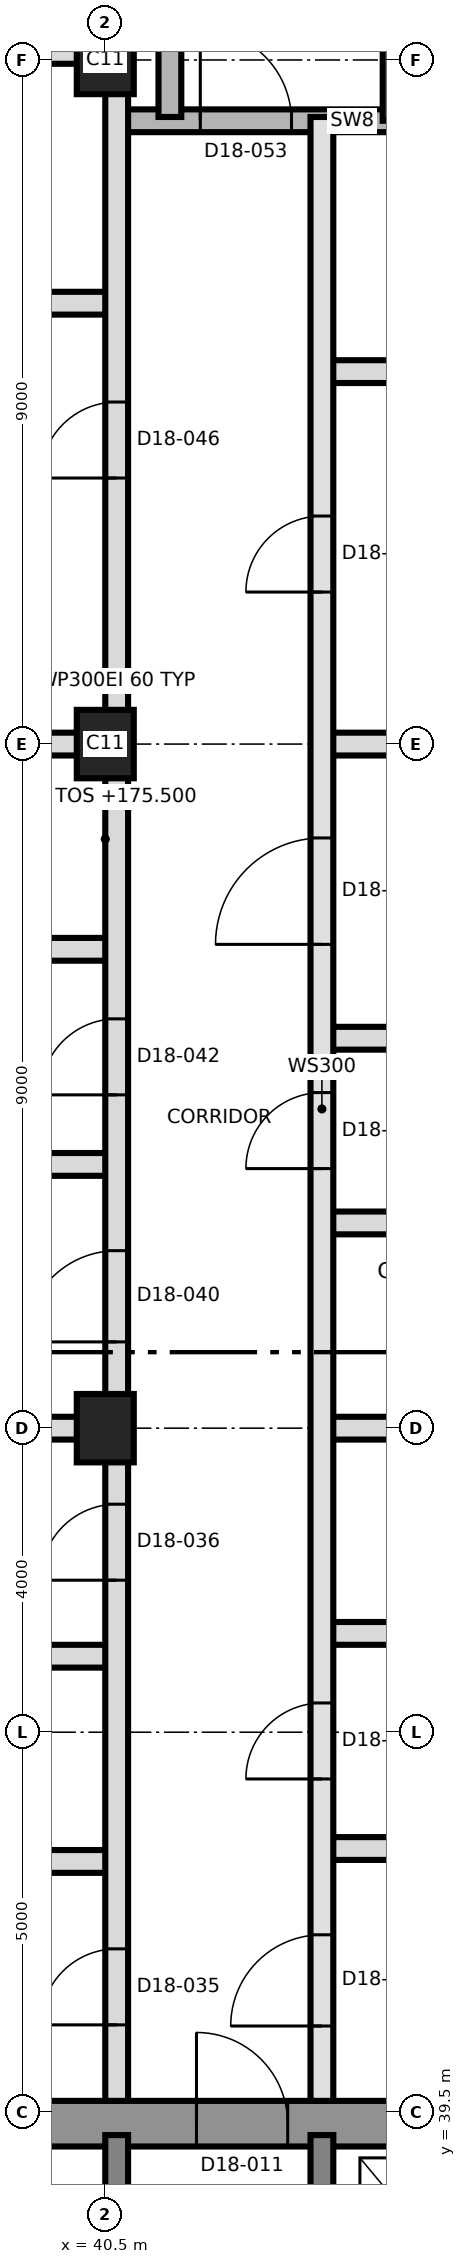
"""IFC4 building model, lengths in metres.
Left out: names, types, materials, properties, quantities, classifications, styles, units other than length and angle.
Written with IfcOpenShell. Run it as: python <this file> out.ifc"""

import sys

from ifc_helpers import new_model, si_unit, direction, frame, frame_2d, origin, origin_2d, place, context, subcontext, project, spatial, rectangle, extrude, element, fill, save


model = new_model("IFC4")
c1 = context("Model", 3, precision=1e-05, world=origin(), true_north=direction((0.0, 1.0)))
c2 = subcontext(c1, "Body", "Model", "MODEL_VIEW")
j1 = project(units=[si_unit("LENGTHUNIT", "METRE"), si_unit("PLANEANGLEUNIT", "RADIAN")], contexts=[c1])
p1 = place(None, origin())
s1 = spatial("IfcSite", under=j1, at=p1, CompositionType="ELEMENT")
p2 = place(p1, origin())
s2 = spatial("IfcBuilding", under=s1, at=p2, CompositionType="ELEMENT")
p3 = place(p2, frame((0.0, 0.0, 175.5)))
s3 = spatial("IfcBuildingStorey", under=s2, at=p3, CompositionType="ELEMENT", Elevation=175.5)
p4 = place(p3, frame((31.2, 39.35, 0.0), z_axis=(0.0, 0.0, 1.0), x_axis=(1.0, 0.0, 0.0)))
e1 = element("IfcWall", 1, at=p4, inside=s3, PredefinedType="SHEAR", context=c2, shape_type="SweptSolid", body=[
    extrude(rectangle(XDim=27.0, YDim=0.6, at=frame_2d((13.5, 0.0))), origin(), (0.0, 0.0, 1.0), 3.7),
])
p5 = place(p4, frame((10.5, 0.0, 0.0)))
e2 = element("IfcOpeningElement", 2, at=p5, cuts=e1, PredefinedType="OPENING", context=c2, shape_type="SweptSolid", body=[
    extrude(rectangle(XDim=1.2, YDim=2.1, at=frame_2d((0.6, 1.05))), frame((0.0, 0.31, 0.0), z_axis=(0.0, -1.0, 0.0), x_axis=(1.0, 0.0, 0.0)), (0.0, 0.0, 1.0), 0.62),
])
for number, where, z_axis, x_axis in (
    (3, (40.65, 33.5, 0.0), (0.0, 0.0, 1.0), (0.0, 1.0, 0.0)),
    (4, (43.35, 33.5, 0.0), (0.0, 0.0, 1.0), (0.0, 1.0, 0.0)),
):
    element("IfcWall", number, at=place(p3, frame(where, z_axis=z_axis, x_axis=x_axis)), inside=s3, PredefinedType="SHEAR", context=c2, shape_type="SweptSolid", body=[
        extrude(rectangle(XDim=5.7, YDim=0.3, at=frame_2d((2.85, 0.0))), origin(), (0.0, 0.0, 1.0), 3.7),
    ])
for number, where, z_axis, x_axis in (
    (5, (40.5, 48.5, 0.0), (0.0, 0.0, 1.0), (0.0, 1.0, 0.0)),
    (6, (40.5, 57.5, 0.0), (0.0, 0.0, 1.0), (0.0, 1.0, 0.0)),
    (7, (40.5, 66.5, 0.0), (0.0, 0.0, 1.0), (0.0, 1.0, 0.0)),
):
    element("IfcColumn", number, at=place(p3, frame(where, z_axis=z_axis, x_axis=x_axis)), inside=s3, PredefinedType="COLUMN", context=c2, shape_type="SweptSolid", body=[
        extrude(rectangle(XDim=0.9, YDim=0.75, at=origin_2d()), origin(), (0.0, 0.0, 1.0), 3.7),
    ])
p6 = place(p3, frame((37.45, 42.8, 0.0), z_axis=(0.0, 0.0, 1.0), x_axis=(1.0, 0.0, 0.0)))
e8 = element("IfcWall", 8, at=p6, inside=s3, PredefinedType="PARTITIONING", context=c2, shape_type="SweptSolid", body=[
    extrude(rectangle(XDim=3.2, YDim=0.3, at=frame_2d((1.6, 0.0))), origin(), (0.0, 0.0, 1.0), 3.4),
])
p7 = place(p3, frame((43.35, 42.97, 0.0), z_axis=(0.0, 0.0, 1.0), x_axis=(1.0, 0.0, 0.0)))
e9 = element("IfcWall", 9, at=p7, inside=s3, PredefinedType="PARTITIONING", context=c2, shape_type="SweptSolid", body=[
    extrude(rectangle(XDim=9.163, YDim=0.3, at=frame_2d((4.582, 0.0))), origin(), (0.0, 0.0, 1.0), 3.4),
])
p8 = place(p3, frame((29.705, 45.5, 0.0), z_axis=(0.0, 0.0, 1.0), x_axis=(1.0, 0.0, 0.0)))
e10 = element("IfcWall", 10, at=p8, inside=s3, PredefinedType="PARTITIONING", context=c2, shape_type="SweptSolid", body=[
    extrude(rectangle(XDim=10.945, YDim=0.3, at=frame_2d((5.472, 0.0))), origin(), (0.0, 0.0, 1.0), 3.4),
])
p9 = place(p3, frame((43.35, 45.8, 0.0), z_axis=(0.0, 0.0, 1.0), x_axis=(1.0, 0.0, 0.0)))
e11 = element("IfcWall", 11, at=p9, inside=s3, PredefinedType="PARTITIONING", context=c2, shape_type="SweptSolid", body=[
    extrude(rectangle(XDim=3.2, YDim=0.3, at=frame_2d((1.6, 0.0))), origin(), (0.0, 0.0, 1.0), 3.4),
])
p10 = place(p3, frame((29.705, 48.5, 0.0), z_axis=(0.0, 0.0, 1.0), x_axis=(1.0, 0.0, 0.0)))
e12 = element("IfcWall", 12, at=p10, inside=s3, PredefinedType="PARTITIONING", context=c2, shape_type="SweptSolid", body=[
    extrude(rectangle(XDim=10.945, YDim=0.3, at=frame_2d((5.472, 0.0))), origin(), (0.0, 0.0, 1.0), 3.4),
])
p11 = place(p3, frame((43.35, 48.5, 0.0), z_axis=(0.0, 0.0, 1.0), x_axis=(1.0, 0.0, 0.0)))
e13 = element("IfcWall", 13, at=p11, inside=s3, PredefinedType="PARTITIONING", context=c2, shape_type="SweptSolid", body=[
    extrude(rectangle(XDim=8.125, YDim=0.3, at=frame_2d((4.062, 0.0))), origin(), (0.0, 0.0, 1.0), 3.4),
])
p12 = place(p3, frame((43.35, 51.2, 0.0), z_axis=(0.0, 0.0, 1.0), x_axis=(1.0, 0.0, 0.0)))
e14 = element("IfcWall", 14, at=p12, inside=s3, PredefinedType="PARTITIONING", context=c2, shape_type="SweptSolid", body=[
    extrude(rectangle(XDim=3.2, YDim=0.3, at=frame_2d((1.6, 0.0))), origin(), (0.0, 0.0, 1.0), 3.4),
])
p13 = place(p3, frame((29.705, 51.97, 0.0), z_axis=(0.0, 0.0, 1.0), x_axis=(1.0, 0.0, 0.0)))
e15 = element("IfcWall", 15, at=p13, inside=s3, PredefinedType="PARTITIONING", context=c2, shape_type="SweptSolid", body=[
    extrude(rectangle(XDim=10.945, YDim=0.3, at=frame_2d((5.472, 0.0))), origin(), (0.0, 0.0, 1.0), 3.4),
])
p14 = place(p3, frame((43.35, 53.63, 0.0), z_axis=(0.0, 0.0, 1.0), x_axis=(1.0, 0.0, 0.0)))
e16 = element("IfcWall", 16, at=p14, inside=s3, PredefinedType="PARTITIONING", context=c2, shape_type="SweptSolid", body=[
    extrude(rectangle(XDim=8.125, YDim=0.3, at=frame_2d((4.062, 0.0))), origin(), (0.0, 0.0, 1.0), 3.4),
])
p15 = place(p3, frame((37.45, 54.8, 0.0), z_axis=(0.0, 0.0, 1.0), x_axis=(1.0, 0.0, 0.0)))
e17 = element("IfcWall", 17, at=p15, inside=s3, PredefinedType="PARTITIONING", context=c2, shape_type="SweptSolid", body=[
    extrude(rectangle(XDim=3.2, YDim=0.3, at=frame_2d((1.6, 0.0))), origin(), (0.0, 0.0, 1.0), 3.4),
])
p16 = place(p3, frame((29.705, 57.5, 0.0), z_axis=(0.0, 0.0, 1.0), x_axis=(1.0, 0.0, 0.0)))
e18 = element("IfcWall", 18, at=p16, inside=s3, PredefinedType="PARTITIONING", context=c2, shape_type="SweptSolid", body=[
    extrude(rectangle(XDim=10.945, YDim=0.3, at=frame_2d((5.472, 0.0))), origin(), (0.0, 0.0, 1.0), 3.4),
])
p17 = place(p3, frame((43.35, 57.5, 0.0), z_axis=(0.0, 0.0, 1.0), x_axis=(1.0, 0.0, 0.0)))
e19 = element("IfcWall", 19, at=p17, inside=s3, PredefinedType="PARTITIONING", context=c2, shape_type="SweptSolid", body=[
    extrude(rectangle(XDim=8.125, YDim=0.3, at=frame_2d((4.062, 0.0))), origin(), (0.0, 0.0, 1.0), 3.4),
])
p18 = place(p3, frame((43.35, 62.4, 0.0), z_axis=(0.0, 0.0, 1.0), x_axis=(1.0, 0.0, 0.0)))
e20 = element("IfcWall", 20, at=p18, inside=s3, PredefinedType="PARTITIONING", context=c2, shape_type="SweptSolid", body=[
    extrude(rectangle(XDim=8.125, YDim=0.3, at=frame_2d((4.062, 0.0))), origin(), (0.0, 0.0, 1.0), 3.4),
])
p19 = place(p18, frame((4.65, 0.0, 0.0)))
e21 = element("IfcOpeningElement", 21, at=p19, cuts=e20, PredefinedType="OPENING", context=c2, shape_type="SweptSolid", body=[
    extrude(rectangle(XDim=1.0, YDim=2.1, at=frame_2d((0.5, 1.05))), frame((0.0, 0.16, 0.0), z_axis=(0.0, -1.0, 0.0), x_axis=(1.0, 0.0, 0.0)), (0.0, 0.0, 1.0), 0.32),
])
p20 = place(p3, frame((29.705, 63.3, 0.0), z_axis=(0.0, 0.0, 1.0), x_axis=(1.0, 0.0, 0.0)))
e22 = element("IfcWall", 22, at=p20, inside=s3, PredefinedType="PARTITIONING", context=c2, shape_type="SweptSolid", body=[
    extrude(rectangle(XDim=10.945, YDim=0.3, at=frame_2d((5.472, 0.0))), origin(), (0.0, 0.0, 1.0), 3.4),
])
p21 = place(p20, frame((5.295, 0.0, 0.0)))
e23 = element("IfcOpeningElement", 23, at=p21, cuts=e22, PredefinedType="OPENING", context=c2, shape_type="SweptSolid", body=[
    extrude(rectangle(XDim=1.0, YDim=2.1, at=frame_2d((0.5, 1.05))), frame((0.0, 0.16, 0.0), z_axis=(0.0, -1.0, 0.0), x_axis=(1.0, 0.0, 0.0)), (0.0, 0.0, 1.0), 0.32),
])
p22 = place(p3, frame((40.65, 65.7, 0.0), z_axis=(0.0, 0.0, 1.0), x_axis=(1.0, 0.0, 0.0)))
e24 = element("IfcWall", 24, at=p22, inside=s3, PredefinedType="SHEAR", context=c2, shape_type="SweptSolid", body=[
    extrude(rectangle(XDim=6.2, YDim=0.3, at=frame_2d((3.1, 0.0))), origin(), (0.0, 0.0, 1.0), 3.4),
])
p23 = place(p22, frame((1.1, 0.0, 0.0)))
e25 = element("IfcOpeningElement", 25, at=p23, cuts=e24, PredefinedType="OPENING", context=c2, shape_type="SweptSolid", body=[
    extrude(rectangle(XDim=1.2, YDim=2.1, at=frame_2d((0.6, 1.05))), frame((0.0, 0.16, 0.0), z_axis=(0.0, -1.0, 0.0), x_axis=(1.0, 0.0, 0.0)), (0.0, 0.0, 1.0), 0.32),
])
p24 = place(p3, frame((37.15, 66.6, 0.0), z_axis=(0.0, 0.0, 1.0), x_axis=(1.0, 0.0, 0.0)))
e26 = element("IfcWall", 26, at=p24, inside=s3, PredefinedType="PARTITIONING", context=c2, shape_type="SweptSolid", body=[
    extrude(rectangle(XDim=3.5, YDim=0.3, at=frame_2d((1.75, 0.0))), origin(), (0.0, 0.0, 1.0), 3.4),
])
p25 = place(p3, frame((40.65, 39.65, 0.0), z_axis=(0.0, 0.0, 1.0), x_axis=(0.0, 1.0, 0.0)))
e27 = element("IfcWall", 27, at=p25, inside=s3, PredefinedType="PARTITIONING", context=c2, shape_type="SweptSolid", body=[
    extrude(rectangle(XDim=37.35, YDim=0.3, at=frame_2d((18.675, 0.0))), origin(), (0.0, 0.0, 1.0), 3.4),
])
p26 = place(p25, frame((1.0, 0.0, 0.0)))
e28 = element("IfcOpeningElement", 28, at=p26, cuts=e27, PredefinedType="OPENING", context=c2, shape_type="SweptSolid", body=[
    extrude(rectangle(XDim=1.0, YDim=2.1, at=frame_2d((0.5, 1.05))), frame((0.0, 0.16, 0.0), z_axis=(0.0, -1.0, 0.0), x_axis=(1.0, 0.0, 0.0)), (0.0, 0.0, 1.0), 0.32),
])
p27 = place(p25, frame((6.85, 0.0, 0.0)))
e29 = element("IfcOpeningElement", 29, at=p27, cuts=e27, PredefinedType="OPENING", context=c2, shape_type="SweptSolid", body=[
    extrude(rectangle(XDim=1.0, YDim=2.1, at=frame_2d((0.5, 1.05))), frame((0.0, 0.16, 0.0), z_axis=(0.0, -1.0, 0.0), x_axis=(1.0, 0.0, 0.0)), (0.0, 0.0, 1.0), 0.32),
])
p28 = place(p25, frame((9.985, 0.0, 0.0)))
e30 = element("IfcOpeningElement", 30, at=p28, cuts=e27, PredefinedType="OPENING", context=c2, shape_type="SweptSolid", body=[
    extrude(rectangle(XDim=1.2, YDim=2.1, at=frame_2d((0.6, 1.05))), frame((0.0, 0.16, 0.0), z_axis=(0.0, -1.0, 0.0), x_axis=(1.0, 0.0, 0.0)), (0.0, 0.0, 1.0), 0.32),
])
p29 = place(p25, frame((13.235, 0.0, 0.0)))
e31 = element("IfcOpeningElement", 31, at=p29, cuts=e27, PredefinedType="OPENING", context=c2, shape_type="SweptSolid", body=[
    extrude(rectangle(XDim=1.0, YDim=2.1, at=frame_2d((0.5, 1.05))), frame((0.0, 0.16, 0.0), z_axis=(0.0, -1.0, 0.0), x_axis=(1.0, 0.0, 0.0)), (0.0, 0.0, 1.0), 0.32),
])
p30 = place(p25, frame((21.35, 0.0, 0.0)))
e32 = element("IfcOpeningElement", 32, at=p30, cuts=e27, PredefinedType="OPENING", context=c2, shape_type="SweptSolid", body=[
    extrude(rectangle(XDim=1.0, YDim=2.4, at=frame_2d((0.5, 1.2))), frame((0.0, 0.16, 0.0), z_axis=(0.0, -1.0, 0.0), x_axis=(1.0, 0.0, 0.0)), (0.0, 0.0, 1.0), 0.32),
])
p31 = place(p3, frame((41.35, 65.75, 0.0), z_axis=(0.0, 0.0, 1.0), x_axis=(0.0, 1.0, 0.0)))
e33 = element("IfcWall", 33, at=p31, inside=s3, PredefinedType="SHEAR", context=c2, shape_type="SweptSolid", body=[
    extrude(rectangle(XDim=8.85, YDim=0.3, at=frame_2d((4.425, 0.0))), origin(), (0.0, 0.0, 1.0), 3.4),
])
p32 = place(p3, frame((43.35, 39.65, 0.0), z_axis=(0.0, 0.0, 1.0), x_axis=(0.0, 1.0, 0.0)))
e34 = element("IfcWall", 34, at=p32, inside=s3, PredefinedType="SOLIDWALL", context=c2, shape_type="SweptSolid", body=[
    extrude(rectangle(XDim=26.1, YDim=0.3, at=frame_2d((13.05, 0.0))), origin(), (0.0, 0.0, 1.0), 3.4),
])
p33 = place(p32, frame((0.985, 0.0, 0.0)))
e35 = element("IfcOpeningElement", 35, at=p33, cuts=e34, PredefinedType="OPENING", context=c2, shape_type="SweptSolid", body=[
    extrude(rectangle(XDim=1.2, YDim=2.1, at=frame_2d((0.6, 1.05))), frame((0.0, 0.16, 0.0), z_axis=(0.0, -1.0, 0.0), x_axis=(1.0, 0.0, 0.0)), (0.0, 0.0, 1.0), 0.32),
])
p34 = place(p32, frame((4.235, 0.0, 0.0)))
e36 = element("IfcOpeningElement", 36, at=p34, cuts=e34, PredefinedType="OPENING", context=c2, shape_type="SweptSolid", body=[
    extrude(rectangle(XDim=1.0, YDim=2.1, at=frame_2d((0.5, 1.05))), frame((0.0, 0.16, 0.0), z_axis=(0.0, -1.0, 0.0), x_axis=(1.0, 0.0, 0.0)), (0.0, 0.0, 1.0), 0.32),
])
p35 = place(p32, frame((12.265, 0.0, 0.0)))
e37 = element("IfcOpeningElement", 37, at=p35, cuts=e34, PredefinedType="OPENING", context=c2, shape_type="SweptSolid", body=[
    extrude(rectangle(XDim=1.0, YDim=2.1, at=frame_2d((0.5, 1.05))), frame((0.0, 0.16, 0.0), z_axis=(0.0, -1.0, 0.0), x_axis=(1.0, 0.0, 0.0)), (0.0, 0.0, 1.0), 0.32),
])
p36 = place(p32, frame((15.215, 0.0, 0.0)))
e38 = element("IfcOpeningElement", 38, at=p36, cuts=e34, PredefinedType="OPENING", context=c2, shape_type="SweptSolid", body=[
    extrude(rectangle(XDim=1.4, YDim=2.1, at=frame_2d((0.7, 1.05))), frame((0.0, 0.16, 0.0), z_axis=(0.0, -1.0, 0.0), x_axis=(1.0, 0.0, 0.0)), (0.0, 0.0, 1.0), 0.32),
])
p37 = place(p32, frame((19.85, 0.0, 0.0)))
e39 = element("IfcOpeningElement", 39, at=p37, cuts=e34, PredefinedType="OPENING", context=c2, shape_type="SweptSolid", body=[
    extrude(rectangle(XDim=1.0, YDim=2.4, at=frame_2d((0.5, 1.2))), frame((0.0, 0.16, 0.0), z_axis=(0.0, -1.0, 0.0), x_axis=(1.0, 0.0, 0.0)), (0.0, 0.0, 1.0), 0.32),
])
p38 = place(p3, frame((44.3, 65.7, 0.0), z_axis=(0.0, 0.0, 1.0), x_axis=(0.0, 1.0, 0.0)))
e40 = element("IfcWall", 40, at=p38, inside=s3, PredefinedType="SHEAR", context=c2, shape_type="SweptSolid", body=[
    extrude(rectangle(XDim=8.9, YDim=0.3, at=frame_2d((4.45, 0.0))), origin(), (0.0, 0.0, 1.0), 3.4),
])
p39 = place(p5, origin())
e41 = element("IfcDoor", 41, at=p39, inside=s3, OperationType="SINGLE_SWING_RIGHT", PredefinedType="DOOR", context=c2, shape_type="SweptSolid", body=[
    extrude(rectangle(XDim=1.2, YDim=2.1, at=frame_2d((0.6, 1.05))), frame((0.0, 0.025, 0.0), z_axis=(0.0, -1.0, 0.0), x_axis=(1.0, 0.0, 0.0)), (0.0, 0.0, 1.0), 0.05),
])
fill(e2, e41)
p40 = place(p33, origin())
e42 = element("IfcDoor", 42, at=p40, inside=s3, OperationType="SINGLE_SWING_LEFT", PredefinedType="DOOR", context=c2, shape_type="SweptSolid", body=[
    extrude(rectangle(XDim=1.2, YDim=2.1, at=frame_2d((0.6, 1.05))), frame((0.0, 0.025, 0.0), z_axis=(0.0, -1.0, 0.0), x_axis=(1.0, 0.0, 0.0)), (0.0, 0.0, 1.0), 0.05),
])
fill(e35, e42)
p41 = place(p34, origin())
e43 = element("IfcDoor", 43, at=p41, inside=s3, OperationType="SINGLE_SWING_RIGHT", PredefinedType="DOOR", context=c2, shape_type="SweptSolid", body=[
    extrude(rectangle(XDim=1.0, YDim=2.1, at=frame_2d((0.5, 1.05))), frame((0.0, 0.025, 0.0), z_axis=(0.0, -1.0, 0.0), x_axis=(1.0, 0.0, 0.0)), (0.0, 0.0, 1.0), 0.05),
])
fill(e36, e43)
p42 = place(p26, origin())
e44 = element("IfcDoor", 44, at=p42, inside=s3, OperationType="SINGLE_SWING_LEFT", PredefinedType="DOOR", context=c2, shape_type="SweptSolid", body=[
    extrude(rectangle(XDim=1.0, YDim=2.1, at=frame_2d((0.5, 1.05))), frame((0.0, 0.025, 0.0), z_axis=(0.0, -1.0, 0.0), x_axis=(1.0, 0.0, 0.0)), (0.0, 0.0, 1.0), 0.05),
])
fill(e28, e44)
p43 = place(p27, origin())
e45 = element("IfcDoor", 45, at=p43, inside=s3, OperationType="SINGLE_SWING_LEFT", PredefinedType="DOOR", context=c2, shape_type="SweptSolid", body=[
    extrude(rectangle(XDim=1.0, YDim=2.1, at=frame_2d((0.5, 1.05))), frame((0.0, 0.025, 0.0), z_axis=(0.0, -1.0, 0.0), x_axis=(1.0, 0.0, 0.0)), (0.0, 0.0, 1.0), 0.05),
])
fill(e29, e45)
p44 = place(p35, origin())
e46 = element("IfcDoor", 46, at=p44, inside=s3, OperationType="SINGLE_SWING_LEFT", PredefinedType="DOOR", context=c2, shape_type="SweptSolid", body=[
    extrude(rectangle(XDim=1.0, YDim=2.1, at=frame_2d((0.5, 1.05))), frame((0.0, 0.025, 0.0), z_axis=(0.0, -1.0, 0.0), x_axis=(1.0, 0.0, 0.0)), (0.0, 0.0, 1.0), 0.05),
])
fill(e37, e46)
p45 = place(p36, origin())
e47 = element("IfcDoor", 47, at=p45, inside=s3, OperationType="SINGLE_SWING_LEFT", PredefinedType="DOOR", context=c2, shape_type="SweptSolid", body=[
    extrude(rectangle(XDim=1.4, YDim=2.1, at=frame_2d((0.7, 1.05))), frame((0.0, 0.025, 0.0), z_axis=(0.0, -1.0, 0.0), x_axis=(1.0, 0.0, 0.0)), (0.0, 0.0, 1.0), 0.05),
])
fill(e38, e47)
p46 = place(p28, origin())
e48 = element("IfcDoor", 48, at=p46, inside=s3, OperationType="SINGLE_SWING_LEFT", PredefinedType="DOOR", context=c2, shape_type="SweptSolid", body=[
    extrude(rectangle(XDim=1.2, YDim=2.1, at=frame_2d((0.6, 1.05))), frame((0.0, 0.025, 0.0), z_axis=(0.0, -1.0, 0.0), x_axis=(1.0, 0.0, 0.0)), (0.0, 0.0, 1.0), 0.05),
])
fill(e30, e48)
p47 = place(p29, origin())
e49 = element("IfcDoor", 49, at=p47, inside=s3, OperationType="SINGLE_SWING_RIGHT", PredefinedType="DOOR", context=c2, shape_type="SweptSolid", body=[
    extrude(rectangle(XDim=1.0, YDim=2.1, at=frame_2d((0.5, 1.05))), frame((0.0, 0.025, 0.0), z_axis=(0.0, -1.0, 0.0), x_axis=(1.0, 0.0, 0.0)), (0.0, 0.0, 1.0), 0.05),
])
fill(e31, e49)
p48 = place(p37, origin())
e50 = element("IfcDoor", 50, at=p48, inside=s3, OperationType="SINGLE_SWING_LEFT", PredefinedType="DOOR", context=c2, shape_type="SweptSolid", body=[
    extrude(rectangle(XDim=1.0, YDim=2.4, at=frame_2d((0.5, 1.2))), frame((0.0, 0.025, 0.0), z_axis=(0.0, -1.0, 0.0), x_axis=(1.0, 0.0, 0.0)), (0.0, 0.0, 1.0), 0.05),
])
fill(e39, e50)
p49 = place(p30, origin())
e51 = element("IfcDoor", 51, at=p49, inside=s3, OperationType="SINGLE_SWING_LEFT", PredefinedType="DOOR", context=c2, shape_type="SweptSolid", body=[
    extrude(rectangle(XDim=1.0, YDim=2.4, at=frame_2d((0.5, 1.2))), frame((0.0, 0.025, 0.0), z_axis=(0.0, -1.0, 0.0), x_axis=(1.0, 0.0, 0.0)), (0.0, 0.0, 1.0), 0.05),
])
fill(e32, e51)
p50 = place(p23, origin())
e52 = element("IfcDoor", 52, at=p50, inside=s3, OperationType="SINGLE_SWING_RIGHT", PredefinedType="DOOR", context=c2, shape_type="SweptSolid", body=[
    extrude(rectangle(XDim=1.2, YDim=2.1, at=frame_2d((0.6, 1.05))), frame((0.0, 0.025, 0.0), z_axis=(0.0, -1.0, 0.0), x_axis=(1.0, 0.0, 0.0)), (0.0, 0.0, 1.0), 0.05),
])
fill(e25, e52)
save(model, sys.argv[1])
